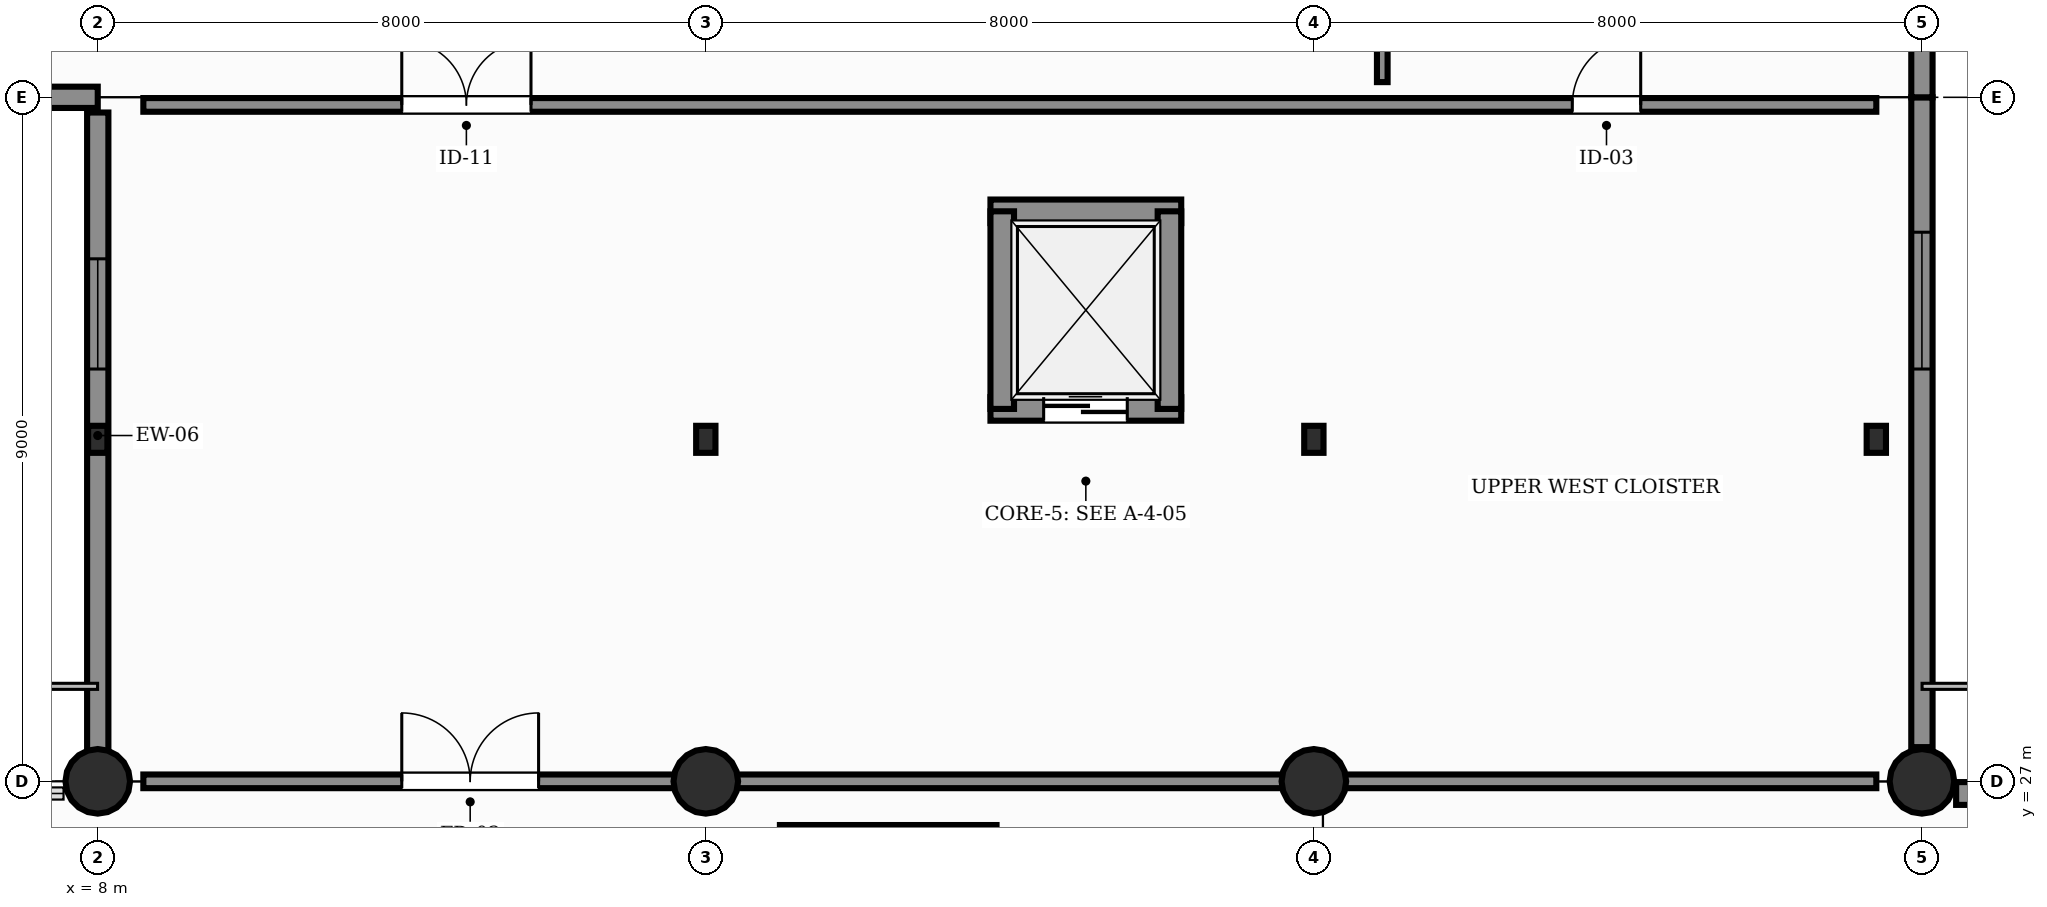
"""IFC4 building model, lengths in metres.
Left out: names, types, materials, properties, quantities, classifications, styles, units other than length and angle.
Written with IfcOpenShell. Run it as: python <this file> out.ifc"""

import sys

from ifc_helpers import new_model, si_unit, direction, frame, frame_2d, origin, origin_2d, place, context, subcontext, project, spatial, rectangle, hollow_rectangle, circle, extrude, element, fill, save


model = new_model("IFC4")
c1 = context("Model", 3, precision=1e-05, world=origin(), true_north=direction((0.0, 1.0)))
c2 = subcontext(c1, "Body", "Model", "MODEL_VIEW")
j1 = project(units=[si_unit("LENGTHUNIT", "METRE"), si_unit("PLANEANGLEUNIT", "RADIAN")], contexts=[c1])
p1 = place(None, origin())
s1 = spatial("IfcSite", under=j1, at=p1, CompositionType="ELEMENT")
p2 = place(p1, origin())
s2 = spatial("IfcBuilding", under=s1, at=p2, CompositionType="ELEMENT")
p3 = place(p2, frame((0.0, 0.0, 6.0)))
s3 = spatial("IfcBuildingStorey", under=s2, at=p3, CompositionType="ELEMENT", Elevation=6.0)
p4 = place(p3, frame((8.0, 27.0, 0.0), z_axis=(0.0, 0.0, 1.0), x_axis=(1.0, 0.0, 0.0)))
e1 = element("IfcColumn", 1, at=p4, inside=s3, PredefinedType="COLUMN", context=c2, shape_type="SweptSolid", body=[
    extrude(circle(Radius=0.425, at=origin_2d()), origin(), (0.0, 0.0, 1.0), 5.4),
])
p5 = place(p3, frame((8.0, 31.5, 0.0), z_axis=(0.0, 0.0, 1.0), x_axis=(1.0, 0.0, 0.0)))
e2 = element("IfcColumn", 2, at=p5, inside=s3, PredefinedType="COLUMN", context=c2, shape_type="SweptSolid", body=[
    extrude(hollow_rectangle(XDim=0.254, YDim=0.356, WallThickness=0.016, InnerFilletRadius=0.016, OuterFilletRadius=0.032, at=origin_2d()), origin(), (0.0, 0.0, 1.0), 5.4),
])
p6 = place(p3, frame((16.0, 27.0, 0.0), z_axis=(0.0, 0.0, 1.0), x_axis=(1.0, 0.0, 0.0)))
e3 = element("IfcColumn", 3, at=p6, inside=s3, PredefinedType="COLUMN", context=c2, shape_type="SweptSolid", body=[
    extrude(circle(Radius=0.425, at=origin_2d()), origin(), (0.0, 0.0, 1.0), 5.4),
])
p7 = place(p3, frame((16.0, 31.5, 0.0), z_axis=(0.0, 0.0, 1.0), x_axis=(1.0, 0.0, 0.0)))
e4 = element("IfcColumn", 4, at=p7, inside=s3, PredefinedType="COLUMN", context=c2, shape_type="SweptSolid", body=[
    extrude(hollow_rectangle(XDim=0.254, YDim=0.356, WallThickness=0.016, InnerFilletRadius=0.016, OuterFilletRadius=0.032, at=origin_2d()), origin(), (0.0, 0.0, 1.0), 5.4),
])
p8 = place(p3, frame((24.0, 27.0, 0.0), z_axis=(0.0, 0.0, 1.0), x_axis=(1.0, 0.0, 0.0)))
e5 = element("IfcColumn", 5, at=p8, inside=s3, PredefinedType="COLUMN", context=c2, shape_type="SweptSolid", body=[
    extrude(circle(Radius=0.425, at=origin_2d()), origin(), (0.0, 0.0, 1.0), 5.4),
])
for number, where, z_axis, x_axis in (
    (6, (24.0, 31.5, 0.0), (0.0, 0.0, 1.0), (1.0, 0.0, 0.0)),
    (7, (31.4, 31.5, 0.0), (0.0, 0.0, 1.0), (1.0, 0.0, 0.0)),
):
    element("IfcColumn", number, at=place(p3, frame(where, z_axis=z_axis, x_axis=x_axis)), inside=s3, PredefinedType="COLUMN", context=c2, shape_type="SweptSolid", body=[
        extrude(hollow_rectangle(XDim=0.254, YDim=0.356, WallThickness=0.016, InnerFilletRadius=0.016, OuterFilletRadius=0.032, at=origin_2d()), origin(), (0.0, 0.0, 1.0), 5.4),
    ])
p9 = place(p3, frame((32.0, 27.0, 0.0), z_axis=(0.0, 0.0, 1.0), x_axis=(1.0, 0.0, 0.0)))
e8 = element("IfcColumn", 8, at=p9, inside=s3, PredefinedType="COLUMN", context=c2, shape_type="SweptSolid", body=[
    extrude(circle(Radius=0.425, at=origin_2d()), origin(), (0.0, 0.0, 1.0), 5.4),
])
p10 = place(p3, frame((32.45, 26.84, 0.0), z_axis=(0.0, 0.0, 1.0), x_axis=(1.0, 0.0, 0.0)))
e9 = element("IfcWall", 9, at=p10, inside=s3, PredefinedType="SOLIDWALL", context=c2, shape_type="SweptSolid", body=[
    extrude(rectangle(XDim=7.1, YDim=0.3, at=frame_2d((3.55, 0.0))), origin(), (0.0, 0.0, 1.0), 4.18),
])
p11 = place(p3, frame((0.0, 36.0, 0.0), z_axis=(0.0, 0.0, 1.0), x_axis=(1.0, 0.0, 0.0)))
e10 = element("IfcWall", 10, at=p11, inside=s3, PredefinedType="SOLIDWALL", context=c2, shape_type="SweptSolid", body=[
    extrude(rectangle(XDim=8.0, YDim=0.28, at=frame_2d((4.0, 0.0))), origin(), (0.0, 0.0, 1.0), 4.35),
])
p12 = place(p11, frame((3.05, 0.0, 1.6)))
e11 = element("IfcOpeningElement", 11, at=p12, cuts=e10, PredefinedType="OPENING", context=c2, shape_type="SweptSolid", body=[
    extrude(rectangle(XDim=1.9, YDim=0.9, at=frame_2d((0.95, 0.45))), frame((0.0, 0.15, 0.0), z_axis=(0.0, -1.0, 0.0), x_axis=(1.0, 0.0, 0.0)), (0.0, 0.0, 1.0), 0.3),
])
p13 = place(p3, frame((8.0, 27.3, 0.0), z_axis=(0.0, 0.0, 1.0), x_axis=(0.0, 1.0, 0.0)))
e12 = element("IfcWall", 12, at=p13, inside=s3, PredefinedType="SOLIDWALL", context=c2, shape_type="SweptSolid", body=[
    extrude(rectangle(XDim=8.5, YDim=0.28, at=frame_2d((4.25, 0.0))), origin(), (0.0, 0.0, 1.0), 4.35),
])
p14 = place(p13, frame((5.125, 0.0, 1.1)))
e13 = element("IfcOpeningElement", 13, at=p14, cuts=e12, PredefinedType="OPENING", context=c2, shape_type="SweptSolid", body=[
    extrude(rectangle(XDim=1.45, YDim=1.3, at=frame_2d((0.725, 0.65))), frame((0.0, 0.15, 0.0), z_axis=(0.0, -1.0, 0.0), x_axis=(1.0, 0.0, 0.0)), (0.0, 0.0, 1.0), 0.3),
])
p15 = place(p3, frame((32.0, 27.45, 0.0), z_axis=(0.0, 0.0, 1.0), x_axis=(0.0, 1.0, 0.0)))
e14 = element("IfcWall", 14, at=p15, inside=s3, PredefinedType="SOLIDWALL", context=c2, shape_type="SweptSolid", body=[
    extrude(rectangle(XDim=8.55, YDim=0.28, at=frame_2d((4.275, 0.0))), origin(), (0.0, 0.0, 1.0), 4.35),
])
p16 = place(p15, frame((4.975, 0.0, 1.1)))
e15 = element("IfcOpeningElement", 15, at=p16, cuts=e14, PredefinedType="OPENING", context=c2, shape_type="SweptSolid", body=[
    extrude(rectangle(XDim=1.8, YDim=1.35, at=frame_2d((0.9, 0.675))), frame((0.0, 0.15, 0.0), z_axis=(0.0, -1.0, 0.0), x_axis=(1.0, 0.0, 0.0)), (0.0, 0.0, 1.0), 0.3),
])
p17 = place(p3, frame((32.0, 36.0, 0.0), z_axis=(0.0, 0.0, 1.0), x_axis=(0.0, 1.0, 0.0)))
e16 = element("IfcWall", 16, at=p17, inside=s3, PredefinedType="SOLIDWALL", context=c2, shape_type="SweptSolid", body=[
    extrude(rectangle(XDim=8.3, YDim=0.28, at=frame_2d((4.15, 0.0))), origin(), (0.0, 0.0, 1.0), 4.35),
])
p18 = place(p17, frame((4.85, 0.0, 1.1)))
e17 = element("IfcOpeningElement", 17, at=p18, cuts=e16, PredefinedType="OPENING", context=c2, shape_type="SweptSolid", body=[
    extrude(rectangle(XDim=1.8, YDim=1.35, at=frame_2d((0.9, 0.675))), frame((0.0, 0.15, 0.0), z_axis=(0.0, -1.0, 0.0), x_axis=(1.0, 0.0, 0.0)), (0.0, 0.0, 1.0), 0.3),
])
p19 = place(p3, frame((16.975, 26.22, 0.0), z_axis=(0.0, 0.0, 1.0), x_axis=(1.0, 0.0, 0.0)))
e18 = element("IfcWall", 18, at=p19, inside=s3, PredefinedType="SHEAR", context=c2, shape_type="SweptSolid", body=[
    extrude(rectangle(XDim=2.85, YDim=0.41, at=frame_2d((1.425, 0.0))), origin(), (0.0, 0.0, 1.0), 5.4),
])
p20 = place(p3, frame((19.745, 31.9, 0.0), z_axis=(0.0, 0.0, 1.0), x_axis=(1.0, 0.0, 0.0)))
e19 = element("IfcWall", 19, at=p20, inside=s3, PredefinedType="SHEAR", context=c2, shape_type="SweptSolid", body=[
    extrude(rectangle(XDim=2.51, YDim=0.31, at=frame_2d((1.255, 0.0))), origin(), (0.0, 0.0, 1.0), 5.4),
])
p21 = place(p20, frame((0.7, 0.0, 0.0)))
e20 = element("IfcOpeningElement", 20, at=p21, cuts=e19, PredefinedType="OPENING", context=c2, shape_type="SweptSolid", body=[
    extrude(rectangle(XDim=1.1, YDim=2.2, at=frame_2d((0.55, 1.1))), frame((0.0, 0.165, 0.0), z_axis=(0.0, -1.0, 0.0), x_axis=(1.0, 0.0, 0.0)), (0.0, 0.0, 1.0), 0.33),
])
p22 = place(p3, frame((19.745, 34.5, 0.0), z_axis=(0.0, 0.0, 1.0), x_axis=(1.0, 0.0, 0.0)))
e21 = element("IfcWall", 21, at=p22, inside=s3, PredefinedType="SHEAR", context=c2, shape_type="SweptSolid", body=[
    extrude(rectangle(XDim=2.51, YDim=0.31, at=frame_2d((1.255, 0.0))), origin(), (0.0, 0.0, 1.0), 5.4),
])
for number, where, z_axis, x_axis in (
    (22, (19.9, 31.9, 0.0), (0.0, 0.0, 1.0), (0.0, 1.0, 0.0)),
    (23, (22.1, 31.9, 0.0), (0.0, 0.0, 1.0), (0.0, 1.0, 0.0)),
):
    element("IfcWall", number, at=place(p3, frame(where, z_axis=z_axis, x_axis=x_axis)), inside=s3, PredefinedType="SHEAR", context=c2, shape_type="SweptSolid", body=[
        extrude(rectangle(XDim=2.6, YDim=0.31, at=frame_2d((1.3, 0.0))), origin(), (0.0, 0.0, 1.0), 5.4),
    ])
p23 = place(p3, frame((8.6, 27.0, 0.0), z_axis=(0.0, 0.0, 1.0), x_axis=(1.0, 0.0, 0.0)))
e24 = element("IfcWall", 24, at=p23, inside=s3, PredefinedType="PARTITIONING", context=c2, shape_type="SweptSolid", body=[
    extrude(rectangle(XDim=22.8, YDim=0.18, at=frame_2d((11.4, 0.0))), origin(), (0.0, 0.0, 1.0), 3.85),
])
p24 = place(p23, frame((3.4, 0.0, 0.0)))
e25 = element("IfcOpeningElement", 25, at=p24, cuts=e24, PredefinedType="OPENING", context=c2, shape_type="SweptSolid", body=[
    extrude(rectangle(XDim=1.8, YDim=2.25, at=frame_2d((0.9, 1.125))), frame((0.0, 0.1, 0.0), z_axis=(0.0, -1.0, 0.0), x_axis=(1.0, 0.0, 0.0)), (0.0, 0.0, 1.0), 0.2),
])
p25 = place(p3, frame((8.6, 35.9, 0.0), z_axis=(0.0, 0.0, 1.0), x_axis=(1.0, 0.0, 0.0)))
e26 = element("IfcWall", 26, at=p25, inside=s3, PredefinedType="PARTITIONING", context=c2, shape_type="SweptSolid", body=[
    extrude(rectangle(XDim=22.8, YDim=0.18, at=frame_2d((11.4, 0.0))), origin(), (0.0, 0.0, 1.0), 3.85),
])
p26 = place(p25, frame((3.4, 0.0, 0.0)))
e27 = element("IfcOpeningElement", 27, at=p26, cuts=e26, PredefinedType="OPENING", context=c2, shape_type="SweptSolid", body=[
    extrude(rectangle(XDim=1.7, YDim=2.25, at=frame_2d((0.85, 1.125))), frame((0.0, 0.1, 0.0), z_axis=(0.0, -1.0, 0.0), x_axis=(1.0, 0.0, 0.0)), (0.0, 0.0, 1.0), 0.2),
])
p27 = place(p25, frame((18.8, 0.0, 0.0)))
e28 = element("IfcOpeningElement", 28, at=p27, cuts=e26, PredefinedType="OPENING", context=c2, shape_type="SweptSolid", body=[
    extrude(rectangle(XDim=0.9, YDim=2.15, at=frame_2d((0.45, 1.075))), frame((0.0, 0.1, 0.0), z_axis=(0.0, -1.0, 0.0), x_axis=(1.0, 0.0, 0.0)), (0.0, 0.0, 1.0), 0.2),
])
p28 = place(p3, frame((24.9, 36.2, 0.0), z_axis=(0.0, 0.0, 1.0), x_axis=(0.0, 1.0, 0.0)))
e29 = element("IfcWall", 29, at=p28, inside=s3, PredefinedType="PARTITIONING", context=c2, shape_type="SweptSolid", body=[
    extrude(rectangle(XDim=25.0, YDim=0.14, at=frame_2d((12.5, 0.0))), origin(), (0.0, 0.0, 1.0), 3.85),
])
p29 = place(p28, frame((6.5, 0.0, 0.0)))
e30 = element("IfcOpeningElement", 30, at=p29, cuts=e29, PredefinedType="OPENING", context=c2, shape_type="SweptSolid", body=[
    extrude(rectangle(XDim=0.9, YDim=2.15, at=frame_2d((0.45, 1.075))), frame((0.0, 0.08, 0.0), z_axis=(0.0, -1.0, 0.0), x_axis=(1.0, 0.0, 0.0)), (0.0, 0.0, 1.0), 0.16),
])
p30 = place(p14, origin())
e31 = element("IfcWindow", 31, at=p30, inside=s3, PartitioningType="SINGLE_PANEL", PredefinedType="WINDOW", context=c2, shape_type="SweptSolid", body=[
    extrude(rectangle(XDim=1.45, YDim=1.3, at=frame_2d((0.725, 0.65))), frame((0.0, 0.03, 0.0), z_axis=(0.0, -1.0, 0.0), x_axis=(1.0, 0.0, 0.0)), (0.0, 0.0, 1.0), 0.06),
])
fill(e13, e31)
p31 = place(p16, origin())
e32 = element("IfcWindow", 32, at=p31, inside=s3, PartitioningType="SINGLE_PANEL", PredefinedType="WINDOW", context=c2, shape_type="SweptSolid", body=[
    extrude(rectangle(XDim=1.8, YDim=1.35, at=frame_2d((0.9, 0.675))), frame((0.0, 0.03, 0.0), z_axis=(0.0, -1.0, 0.0), x_axis=(1.0, 0.0, 0.0)), (0.0, 0.0, 1.0), 0.06),
])
fill(e15, e32)
p32 = place(p21, origin())
e33 = element("IfcDoor", 33, at=p32, inside=s3, OperationType="DOUBLE_DOOR_SLIDING", PredefinedType="DOOR", context=c2, shape_type="SweptSolid", body=[
    extrude(rectangle(XDim=1.1, YDim=2.2, at=frame_2d((0.55, 1.1))), frame((0.0, 0.025, 0.0), z_axis=(0.0, -1.0, 0.0), x_axis=(1.0, 0.0, 0.0)), (0.0, 0.0, 1.0), 0.05),
])
fill(e20, e33)
p33 = place(p24, origin())
e34 = element("IfcDoor", 34, at=p33, inside=s3, OperationType="DOUBLE_DOOR_SINGLE_SWING", PredefinedType="DOOR", context=c2, shape_type="SweptSolid", body=[
    extrude(rectangle(XDim=1.8, YDim=2.25, at=frame_2d((0.9, 1.125))), frame((0.0, 0.025, 0.0), z_axis=(0.0, -1.0, 0.0), x_axis=(1.0, 0.0, 0.0)), (0.0, 0.0, 1.0), 0.05),
])
fill(e25, e34)
p34 = place(p26, origin())
e35 = element("IfcDoor", 35, at=p34, inside=s3, OperationType="DOUBLE_SWING_LEFT", PredefinedType="DOOR", context=c2, shape_type="SweptSolid", body=[
    extrude(rectangle(XDim=1.7, YDim=2.25, at=frame_2d((0.85, 1.125))), frame((0.0, 0.025, 0.0), z_axis=(0.0, -1.0, 0.0), x_axis=(1.0, 0.0, 0.0)), (0.0, 0.0, 1.0), 0.05),
])
fill(e27, e35)
p35 = place(p27, origin())
e36 = element("IfcDoor", 36, at=p35, inside=s3, OperationType="SINGLE_SWING_RIGHT", PredefinedType="DOOR", context=c2, shape_type="SweptSolid", body=[
    extrude(rectangle(XDim=0.9, YDim=2.15, at=frame_2d((0.45, 1.075))), frame((0.0, 0.025, 0.0), z_axis=(0.0, -1.0, 0.0), x_axis=(1.0, 0.0, 0.0)), (0.0, 0.0, 1.0), 0.05),
])
fill(e28, e36)
save(model, sys.argv[1])
